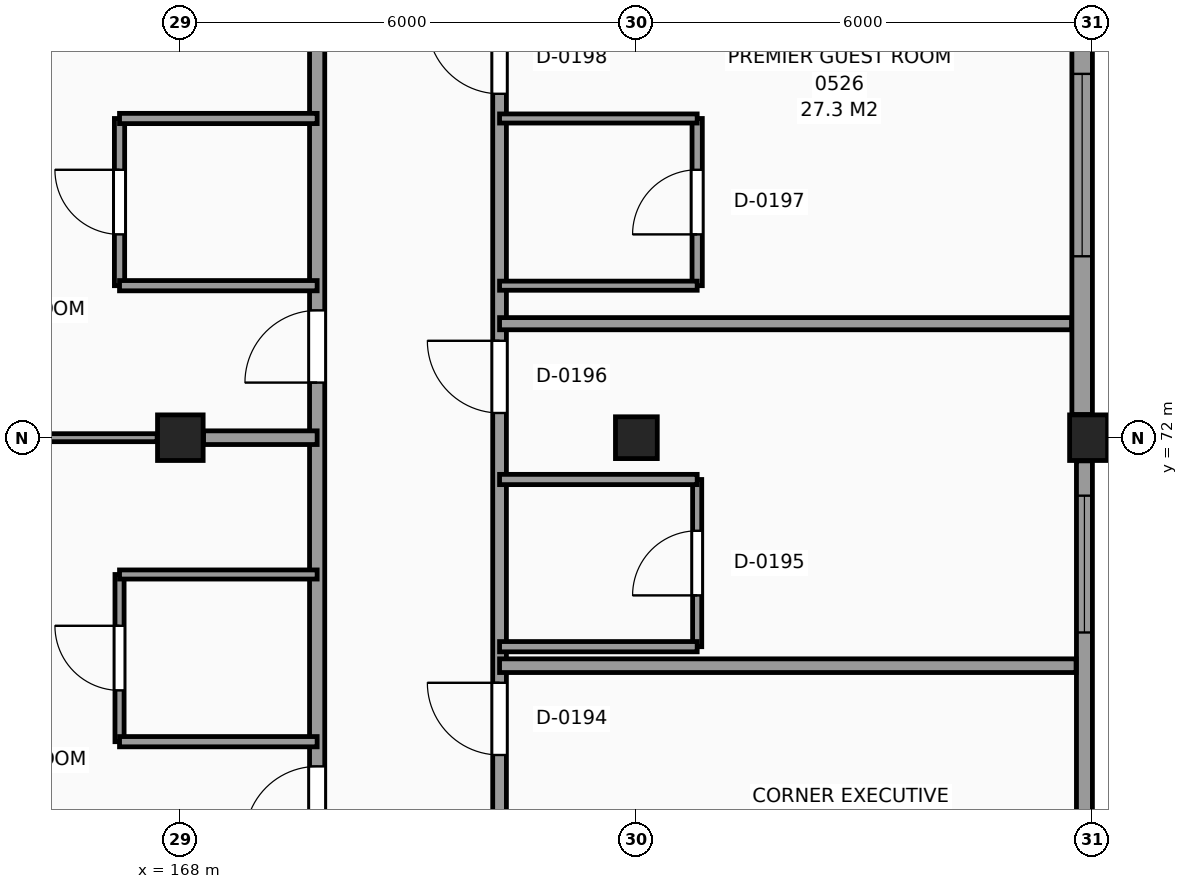
"""IFC4 building model, lengths in metres.
Left out: names, types, materials, properties, quantities, classifications, styles, units other than length and angle.
Written with IfcOpenShell. Run it as: python <this file> out.ifc"""

import sys

from ifc_helpers import new_model, si_unit, direction, frame, frame_2d, origin, origin_2d, place, context, subcontext, project, spatial, rectangle, extrude, element, fill, save


model = new_model("IFC4")
c1 = context("Model", 3, precision=1e-05, world=origin(), true_north=direction((0.0, 1.0)))
c2 = subcontext(c1, "Body", "Model", "MODEL_VIEW")
j1 = project(units=[si_unit("LENGTHUNIT", "METRE"), si_unit("PLANEANGLEUNIT", "RADIAN")], contexts=[c1])
p1 = place(None, origin())
s1 = spatial("IfcSite", under=j1, at=p1, CompositionType="ELEMENT")
p2 = place(p1, origin())
s2 = spatial("IfcBuilding", under=s1, at=p2, CompositionType="ELEMENT")
p3 = place(p2, frame((0.0, 0.0, 24.6)))
s3 = spatial("IfcBuildingStorey", under=s2, at=p3, CompositionType="ELEMENT", Elevation=24.6)
p4 = place(p3, frame((168.0, 72.0, 0.0), z_axis=(0.0, 0.0, 1.0), x_axis=(1.0, 0.0, 0.0)))
e1 = element("IfcColumn", 1, at=p4, inside=s3, PredefinedType="COLUMN", context=c2, shape_type="SweptSolid", body=[
    extrude(rectangle(XDim=0.6, YDim=0.6, at=origin_2d()), origin(), (0.0, 0.0, 1.0), 3.6),
])
p5 = place(p3, frame((174.0, 72.0, 0.0), z_axis=(0.0, 0.0, 1.0), x_axis=(1.0, 0.0, 0.0)))
e2 = element("IfcColumn", 2, at=p5, inside=s3, PredefinedType="COLUMN", context=c2, shape_type="SweptSolid", body=[
    extrude(rectangle(XDim=0.55, YDim=0.55, at=origin_2d()), origin(), (0.0, 0.0, 1.0), 3.6),
])
p6 = place(p3, frame((180.0, 72.0, 0.0), z_axis=(0.0, 0.0, 1.0), x_axis=(1.0, 0.0, 0.0)))
e3 = element("IfcColumn", 3, at=p6, inside=s3, PredefinedType="COLUMN", context=c2, shape_type="SweptSolid", body=[
    extrude(rectangle(XDim=0.6, YDim=0.6, at=origin_2d()), origin(), (0.0, 0.0, 1.0), 3.6),
])
p7 = place(p3, frame((179.895, 66.305, 0.0), z_axis=(0.0, 0.0, 1.0), x_axis=(0.0, 1.0, 0.0)))
e4 = element("IfcWall", 4, at=p7, inside=s3, PredefinedType="SOLIDWALL", context=c2, shape_type="SweptSolid", body=[
    extrude(rectangle(XDim=5.39, YDim=0.21, at=frame_2d((2.695, 0.0))), origin(), (0.0, 0.0, 1.0), 2.73),
])
p8 = place(p7, frame((3.132, 0.0, 0.8)))
e5 = element("IfcOpeningElement", 5, at=p8, cuts=e4, PredefinedType="OPENING", context=c2, shape_type="SweptSolid", body=[
    extrude(rectangle(XDim=1.8, YDim=1.7, at=frame_2d((0.9, 0.85))), frame((0.0, 0.115, 0.0), z_axis=(0.0, -1.0, 0.0), x_axis=(1.0, 0.0, 0.0)), (0.0, 0.0, 1.0), 0.23),
])
p9 = place(p3, frame((179.865, 72.305, 0.0), z_axis=(0.0, 0.0, 1.0), x_axis=(0.0, 1.0, 0.0)))
e6 = element("IfcWall", 6, at=p9, inside=s3, PredefinedType="SOLIDWALL", context=c2, shape_type="SweptSolid", body=[
    extrude(rectangle(XDim=5.39, YDim=0.27, at=frame_2d((2.695, 0.0))), origin(), (0.0, 0.0, 1.0), 2.73),
])
p10 = place(p9, frame((2.082, 0.0, 0.8)))
e7 = element("IfcOpeningElement", 7, at=p10, cuts=e6, PredefinedType="OPENING", context=c2, shape_type="SweptSolid", body=[
    extrude(rectangle(XDim=2.4, YDim=1.75, at=frame_2d((1.2, 0.875))), frame((0.0, 0.145, 0.0), z_axis=(0.0, -1.0, 0.0), x_axis=(1.0, 0.0, 0.0)), (0.0, 0.0, 1.0), 0.29),
])
p11 = place(p3, frame((167.2, 68.0, 0.0), z_axis=(0.0, 0.0, 1.0), x_axis=(0.0, 1.0, 0.0)))
e8 = element("IfcWall", 8, at=p11, inside=s3, PredefinedType="PARTITIONING", context=c2, shape_type="SweptSolid", body=[
    extrude(rectangle(XDim=2.2, YDim=0.12, at=frame_2d((1.1, 0.0))), origin(), (0.0, 0.0, 1.0), 3.38),
])
p12 = place(p11, frame((0.675, 0.0, 0.0)))
e9 = element("IfcOpeningElement", 9, at=p12, cuts=e8, PredefinedType="OPENING", context=c2, shape_type="SweptSolid", body=[
    extrude(rectangle(XDim=0.85, YDim=2.1, at=frame_2d((0.425, 1.05))), frame((0.0, 0.07, 0.0), z_axis=(0.0, -1.0, 0.0), x_axis=(1.0, 0.0, 0.0)), (0.0, 0.0, 1.0), 0.14),
])
p13 = place(p3, frame((167.2, 74.0, 0.0), z_axis=(0.0, 0.0, 1.0), x_axis=(0.0, 1.0, 0.0)))
e10 = element("IfcWall", 10, at=p13, inside=s3, PredefinedType="PARTITIONING", context=c2, shape_type="SweptSolid", body=[
    extrude(rectangle(XDim=2.2, YDim=0.135, at=frame_2d((1.1, 0.0))), origin(), (0.0, 0.0, 1.0), 3.38),
])
p14 = place(p13, frame((0.675, 0.0, 0.0)))
e11 = element("IfcOpeningElement", 11, at=p14, cuts=e10, PredefinedType="OPENING", context=c2, shape_type="SweptSolid", body=[
    extrude(rectangle(XDim=0.85, YDim=2.1, at=frame_2d((0.425, 1.05))), frame((0.0, 0.078, 0.0), z_axis=(0.0, -1.0, 0.0), x_axis=(1.0, 0.0, 0.0)), (0.0, 0.0, 1.0), 0.155),
])
p15 = place(p3, frame((169.8, 42.215, 0.0), z_axis=(0.0, 0.0, 1.0), x_axis=(0.0, 1.0, 0.0)))
e12 = element("IfcWall", 12, at=p15, inside=s3, PredefinedType="PARTITIONING", context=c2, shape_type="SweptSolid", body=[
    extrude(rectangle(XDim=65.605, YDim=0.2, at=frame_2d((32.802, 0.0))), origin(), (0.0, 0.0, 1.0), 3.38),
])
p16 = place(p15, frame((50.185, 0.0, 0.0)))
e13 = element("IfcOpeningElement", 13, at=p16, cuts=e12, PredefinedType="OPENING", context=c2, shape_type="SweptSolid", body=[
    extrude(rectangle(XDim=1.2, YDim=2.2, at=frame_2d((0.6, 1.1))), frame((0.0, 0.11, 0.0), z_axis=(0.0, -1.0, 0.0), x_axis=(1.0, 0.0, 0.0)), (0.0, 0.0, 1.0), 0.22),
])
p17 = place(p15, frame((0.46, 0.0, 0.0)))
e14 = element("IfcOpeningElement", 14, at=p17, cuts=e12, PredefinedType="OPENING", context=c2, shape_type="SweptSolid", body=[
    extrude(rectangle(XDim=0.95, YDim=2.1, at=frame_2d((0.475, 1.05))), frame((0.0, 0.11, 0.0), z_axis=(0.0, -1.0, 0.0), x_axis=(1.0, 0.0, 0.0)), (0.0, 0.0, 1.0), 0.22),
])
p18 = place(p15, frame((6.51, 0.0, 0.0)))
e15 = element("IfcOpeningElement", 15, at=p18, cuts=e12, PredefinedType="OPENING", context=c2, shape_type="SweptSolid", body=[
    extrude(rectangle(XDim=0.95, YDim=2.1, at=frame_2d((0.475, 1.05))), frame((0.0, 0.11, 0.0), z_axis=(0.0, -1.0, 0.0), x_axis=(1.0, 0.0, 0.0)), (0.0, 0.0, 1.0), 0.22),
])
p19 = place(p15, frame((12.51, 0.0, 0.0)))
e16 = element("IfcOpeningElement", 16, at=p19, cuts=e12, PredefinedType="OPENING", context=c2, shape_type="SweptSolid", body=[
    extrude(rectangle(XDim=0.95, YDim=2.1, at=frame_2d((0.475, 1.05))), frame((0.0, 0.11, 0.0), z_axis=(0.0, -1.0, 0.0), x_axis=(1.0, 0.0, 0.0)), (0.0, 0.0, 1.0), 0.22),
])
p20 = place(p15, frame((18.51, 0.0, 0.0)))
e17 = element("IfcOpeningElement", 17, at=p20, cuts=e12, PredefinedType="OPENING", context=c2, shape_type="SweptSolid", body=[
    extrude(rectangle(XDim=0.95, YDim=2.1, at=frame_2d((0.475, 1.05))), frame((0.0, 0.11, 0.0), z_axis=(0.0, -1.0, 0.0), x_axis=(1.0, 0.0, 0.0)), (0.0, 0.0, 1.0), 0.22),
])
p21 = place(p15, frame((24.51, 0.0, 0.0)))
e18 = element("IfcOpeningElement", 18, at=p21, cuts=e12, PredefinedType="OPENING", context=c2, shape_type="SweptSolid", body=[
    extrude(rectangle(XDim=0.95, YDim=2.1, at=frame_2d((0.475, 1.05))), frame((0.0, 0.11, 0.0), z_axis=(0.0, -1.0, 0.0), x_axis=(1.0, 0.0, 0.0)), (0.0, 0.0, 1.0), 0.22),
])
p22 = place(p15, frame((30.51, 0.0, 0.0)))
e19 = element("IfcOpeningElement", 19, at=p22, cuts=e12, PredefinedType="OPENING", context=c2, shape_type="SweptSolid", body=[
    extrude(rectangle(XDim=0.95, YDim=2.1, at=frame_2d((0.475, 1.05))), frame((0.0, 0.11, 0.0), z_axis=(0.0, -1.0, 0.0), x_axis=(1.0, 0.0, 0.0)), (0.0, 0.0, 1.0), 0.22),
])
p23 = place(p15, frame((54.51, 0.0, 0.0)))
e20 = element("IfcOpeningElement", 20, at=p23, cuts=e12, PredefinedType="OPENING", context=c2, shape_type="SweptSolid", body=[
    extrude(rectangle(XDim=0.95, YDim=2.1, at=frame_2d((0.475, 1.05))), frame((0.0, 0.11, 0.0), z_axis=(0.0, -1.0, 0.0), x_axis=(1.0, 0.0, 0.0)), (0.0, 0.0, 1.0), 0.22),
])
p24 = place(p15, frame((60.51, 0.0, 0.0)))
e21 = element("IfcOpeningElement", 21, at=p24, cuts=e12, PredefinedType="OPENING", context=c2, shape_type="SweptSolid", body=[
    extrude(rectangle(XDim=0.95, YDim=2.1, at=frame_2d((0.475, 1.05))), frame((0.0, 0.11, 0.0), z_axis=(0.0, -1.0, 0.0), x_axis=(1.0, 0.0, 0.0)), (0.0, 0.0, 1.0), 0.22),
])
p25 = place(p3, frame((172.2, 42.215, 0.0), z_axis=(0.0, 0.0, 1.0), x_axis=(0.0, 1.0, 0.0)))
e22 = element("IfcWall", 22, at=p25, inside=s3, PredefinedType="PARTITIONING", context=c2, shape_type="SweptSolid", body=[
    extrude(rectangle(XDim=65.605, YDim=0.18, at=frame_2d((32.802, 0.0))), origin(), (0.0, 0.0, 1.0), 3.38),
])
p26 = place(p25, frame((7.61, 0.0, 0.0)))
e23 = element("IfcOpeningElement", 23, at=p26, cuts=e22, PredefinedType="OPENING", context=c2, shape_type="SweptSolid", body=[
    extrude(rectangle(XDim=0.95, YDim=2.1, at=frame_2d((0.475, 1.05))), frame((0.0, 0.1, 0.0), z_axis=(0.0, -1.0, 0.0), x_axis=(1.0, 0.0, 0.0)), (0.0, 0.0, 1.0), 0.2),
])
p27 = place(p25, frame((12.11, 0.0, 0.0)))
e24 = element("IfcOpeningElement", 24, at=p27, cuts=e22, PredefinedType="OPENING", context=c2, shape_type="SweptSolid", body=[
    extrude(rectangle(XDim=0.95, YDim=2.1, at=frame_2d((0.475, 1.05))), frame((0.0, 0.1, 0.0), z_axis=(0.0, -1.0, 0.0), x_axis=(1.0, 0.0, 0.0)), (0.0, 0.0, 1.0), 0.2),
])
p28 = place(p25, frame((16.31, 0.0, 0.0)))
e25 = element("IfcOpeningElement", 25, at=p28, cuts=e22, PredefinedType="OPENING", context=c2, shape_type="SweptSolid", body=[
    extrude(rectangle(XDim=0.95, YDim=2.1, at=frame_2d((0.475, 1.05))), frame((0.0, 0.1, 0.0), z_axis=(0.0, -1.0, 0.0), x_axis=(1.0, 0.0, 0.0)), (0.0, 0.0, 1.0), 0.2),
])
p29 = place(p25, frame((25.61, 0.0, 0.0)))
e26 = element("IfcOpeningElement", 26, at=p29, cuts=e22, PredefinedType="OPENING", context=c2, shape_type="SweptSolid", body=[
    extrude(rectangle(XDim=0.95, YDim=2.1, at=frame_2d((0.475, 1.05))), frame((0.0, 0.1, 0.0), z_axis=(0.0, -1.0, 0.0), x_axis=(1.0, 0.0, 0.0)), (0.0, 0.0, 1.0), 0.2),
])
p30 = place(p25, frame((30.11, 0.0, 0.0)))
e27 = element("IfcOpeningElement", 27, at=p30, cuts=e22, PredefinedType="OPENING", context=c2, shape_type="SweptSolid", body=[
    extrude(rectangle(XDim=0.95, YDim=2.1, at=frame_2d((0.475, 1.05))), frame((0.0, 0.1, 0.0), z_axis=(0.0, -1.0, 0.0), x_axis=(1.0, 0.0, 0.0)), (0.0, 0.0, 1.0), 0.2),
])
p31 = place(p25, frame((34.31, 0.0, 0.0)))
e28 = element("IfcOpeningElement", 28, at=p31, cuts=e22, PredefinedType="OPENING", context=c2, shape_type="SweptSolid", body=[
    extrude(rectangle(XDim=0.95, YDim=2.1, at=frame_2d((0.475, 1.05))), frame((0.0, 0.1, 0.0), z_axis=(0.0, -1.0, 0.0), x_axis=(1.0, 0.0, 0.0)), (0.0, 0.0, 1.0), 0.2),
])
p32 = place(p25, frame((36.51, 0.0, 0.0)))
e29 = element("IfcOpeningElement", 29, at=p32, cuts=e22, PredefinedType="OPENING", context=c2, shape_type="SweptSolid", body=[
    extrude(rectangle(XDim=0.95, YDim=2.1, at=frame_2d((0.475, 1.05))), frame((0.0, 0.1, 0.0), z_axis=(0.0, -1.0, 0.0), x_axis=(1.0, 0.0, 0.0)), (0.0, 0.0, 1.0), 0.2),
])
p33 = place(p25, frame((42.51, 0.0, 0.0)))
e30 = element("IfcOpeningElement", 30, at=p33, cuts=e22, PredefinedType="OPENING", context=c2, shape_type="SweptSolid", body=[
    extrude(rectangle(XDim=0.95, YDim=2.1, at=frame_2d((0.475, 1.05))), frame((0.0, 0.1, 0.0), z_axis=(0.0, -1.0, 0.0), x_axis=(1.0, 0.0, 0.0)), (0.0, 0.0, 1.0), 0.2),
])
p34 = place(p25, frame((52.31, 0.0, 0.0)))
e31 = element("IfcOpeningElement", 31, at=p34, cuts=e22, PredefinedType="OPENING", context=c2, shape_type="SweptSolid", body=[
    extrude(rectangle(XDim=0.95, YDim=2.1, at=frame_2d((0.475, 1.05))), frame((0.0, 0.1, 0.0), z_axis=(0.0, -1.0, 0.0), x_axis=(1.0, 0.0, 0.0)), (0.0, 0.0, 1.0), 0.2),
])
p35 = place(p25, frame((54.51, 0.0, 0.0)))
e32 = element("IfcOpeningElement", 32, at=p35, cuts=e22, PredefinedType="OPENING", context=c2, shape_type="SweptSolid", body=[
    extrude(rectangle(XDim=0.95, YDim=2.1, at=frame_2d((0.475, 1.05))), frame((0.0, 0.1, 0.0), z_axis=(0.0, -1.0, 0.0), x_axis=(1.0, 0.0, 0.0)), (0.0, 0.0, 1.0), 0.2),
])
p36 = place(p25, frame((60.51, 0.0, 0.0)))
e33 = element("IfcOpeningElement", 33, at=p36, cuts=e22, PredefinedType="OPENING", context=c2, shape_type="SweptSolid", body=[
    extrude(rectangle(XDim=0.95, YDim=2.1, at=frame_2d((0.475, 1.05))), frame((0.0, 0.1, 0.0), z_axis=(0.0, -1.0, 0.0), x_axis=(1.0, 0.0, 0.0)), (0.0, 0.0, 1.0), 0.2),
])
p37 = place(p3, frame((174.8, 69.25, 0.0), z_axis=(0.0, 0.0, 1.0), x_axis=(0.0, 1.0, 0.0)))
e34 = element("IfcWall", 34, at=p37, inside=s3, PredefinedType="PARTITIONING", context=c2, shape_type="SweptSolid", body=[
    extrude(rectangle(XDim=2.2, YDim=0.12, at=frame_2d((1.1, 0.0))), origin(), (0.0, 0.0, 1.0), 3.38),
])
p38 = place(p37, frame((0.675, 0.0, 0.0)))
e35 = element("IfcOpeningElement", 35, at=p38, cuts=e34, PredefinedType="OPENING", context=c2, shape_type="SweptSolid", body=[
    extrude(rectangle(XDim=0.85, YDim=2.1, at=frame_2d((0.425, 1.05))), frame((0.0, 0.07, 0.0), z_axis=(0.0, -1.0, 0.0), x_axis=(1.0, 0.0, 0.0)), (0.0, 0.0, 1.0), 0.14),
])
p39 = place(p3, frame((174.8, 74.0, 0.0), z_axis=(0.0, 0.0, 1.0), x_axis=(0.0, 1.0, 0.0)))
e36 = element("IfcWall", 36, at=p39, inside=s3, PredefinedType="PARTITIONING", context=c2, shape_type="SweptSolid", body=[
    extrude(rectangle(XDim=2.2, YDim=0.135, at=frame_2d((1.1, 0.0))), origin(), (0.0, 0.0, 1.0), 3.38),
])
p40 = place(p39, frame((0.675, 0.0, 0.0)))
e37 = element("IfcOpeningElement", 37, at=p40, cuts=e36, PredefinedType="OPENING", context=c2, shape_type="SweptSolid", body=[
    extrude(rectangle(XDim=0.85, YDim=2.1, at=frame_2d((0.425, 1.05))), frame((0.0, 0.078, 0.0), z_axis=(0.0, -1.0, 0.0), x_axis=(1.0, 0.0, 0.0)), (0.0, 0.0, 1.0), 0.155),
])
p41 = place(p3, frame((167.2, 68.0, 0.0), z_axis=(0.0, 0.0, 1.0), x_axis=(1.0, 0.0, 0.0)))
e38 = element("IfcWall", 38, at=p41, inside=s3, PredefinedType="PARTITIONING", context=c2, shape_type="SweptSolid", body=[
    extrude(rectangle(XDim=2.6, YDim=0.135, at=frame_2d((1.3, 0.0))), origin(), (0.0, 0.0, 1.0), 3.38),
])
p42 = place(p3, frame((172.2, 69.0, 0.0), z_axis=(0.0, 0.0, 1.0), x_axis=(1.0, 0.0, 0.0)))
e39 = element("IfcWall", 39, at=p42, inside=s3, PredefinedType="PARTITIONING", context=c2, shape_type="SweptSolid", body=[
    extrude(rectangle(XDim=7.585, YDim=0.18, at=frame_2d((3.792, 0.0))), origin(), (0.0, 0.0, 1.0), 3.38),
])
p43 = place(p3, frame((172.2, 69.25, 0.0), z_axis=(0.0, 0.0, 1.0), x_axis=(1.0, 0.0, 0.0)))
e40 = element("IfcWall", 40, at=p43, inside=s3, PredefinedType="PARTITIONING", context=c2, shape_type="SweptSolid", body=[
    extrude(rectangle(XDim=2.6, YDim=0.135, at=frame_2d((1.3, 0.0))), origin(), (0.0, 0.0, 1.0), 3.38),
])
p44 = place(p3, frame((167.2, 70.2, 0.0), z_axis=(0.0, 0.0, 1.0), x_axis=(1.0, 0.0, 0.0)))
e41 = element("IfcWall", 41, at=p44, inside=s3, PredefinedType="PARTITIONING", context=c2, shape_type="SweptSolid", body=[
    extrude(rectangle(XDim=2.6, YDim=0.12, at=frame_2d((1.3, 0.0))), origin(), (0.0, 0.0, 1.0), 3.38),
])
p45 = place(p3, frame((172.2, 71.45, 0.0), z_axis=(0.0, 0.0, 1.0), x_axis=(1.0, 0.0, 0.0)))
e42 = element("IfcWall", 42, at=p45, inside=s3, PredefinedType="PARTITIONING", context=c2, shape_type="SweptSolid", body=[
    extrude(rectangle(XDim=2.6, YDim=0.135, at=frame_2d((1.3, 0.0))), origin(), (0.0, 0.0, 1.0), 3.38),
])
p46 = place(p3, frame((162.28, 72.0, 0.0), z_axis=(0.0, 0.0, 1.0), x_axis=(1.0, 0.0, 0.0)))
e43 = element("IfcWall", 43, at=p46, inside=s3, PredefinedType="PARTITIONING", context=c2, shape_type="SweptSolid", body=[
    extrude(rectangle(XDim=5.415, YDim=0.105, at=frame_2d((2.708, 0.0))), origin(), (0.0, 0.0, 1.0), 2.58),
])
p47 = place(p3, frame((168.305, 72.0, 0.0), z_axis=(0.0, 0.0, 1.0), x_axis=(1.0, 0.0, 0.0)))
e44 = element("IfcWall", 44, at=p47, inside=s3, PredefinedType="PARTITIONING", context=c2, shape_type="SweptSolid", body=[
    extrude(rectangle(XDim=1.495, YDim=0.18, at=frame_2d((0.748, 0.0))), origin(), (0.0, 0.0, 1.0), 2.58),
])
p48 = place(p3, frame((172.2, 73.5, 0.0), z_axis=(0.0, 0.0, 1.0), x_axis=(1.0, 0.0, 0.0)))
e45 = element("IfcWall", 45, at=p48, inside=s3, PredefinedType="PARTITIONING", context=c2, shape_type="SweptSolid", body=[
    extrude(rectangle(XDim=7.525, YDim=0.16, at=frame_2d((3.763, 0.0))), origin(), (0.0, 0.0, 1.0), 3.38),
])
p49 = place(p3, frame((167.2, 74.0, 0.0), z_axis=(0.0, 0.0, 1.0), x_axis=(1.0, 0.0, 0.0)))
e46 = element("IfcWall", 46, at=p49, inside=s3, PredefinedType="PARTITIONING", context=c2, shape_type="SweptSolid", body=[
    extrude(rectangle(XDim=2.6, YDim=0.135, at=frame_2d((1.3, 0.0))), origin(), (0.0, 0.0, 1.0), 3.38),
])
p50 = place(p3, frame((172.2, 74.0, 0.0), z_axis=(0.0, 0.0, 1.0), x_axis=(1.0, 0.0, 0.0)))
e47 = element("IfcWall", 47, at=p50, inside=s3, PredefinedType="PARTITIONING", context=c2, shape_type="SweptSolid", body=[
    extrude(rectangle(XDim=2.6, YDim=0.12, at=frame_2d((1.3, 0.0))), origin(), (0.0, 0.0, 1.0), 3.38),
])
p51 = place(p3, frame((167.2, 76.2, 0.0), z_axis=(0.0, 0.0, 1.0), x_axis=(1.0, 0.0, 0.0)))
e48 = element("IfcWall", 48, at=p51, inside=s3, PredefinedType="PARTITIONING", context=c2, shape_type="SweptSolid", body=[
    extrude(rectangle(XDim=2.6, YDim=0.135, at=frame_2d((1.3, 0.0))), origin(), (0.0, 0.0, 1.0), 3.38),
])
p52 = place(p3, frame((172.2, 76.2, 0.0), z_axis=(0.0, 0.0, 1.0), x_axis=(1.0, 0.0, 0.0)))
e49 = element("IfcWall", 49, at=p52, inside=s3, PredefinedType="PARTITIONING", context=c2, shape_type="SweptSolid", body=[
    extrude(rectangle(XDim=2.6, YDim=0.12, at=frame_2d((1.3, 0.0))), origin(), (0.0, 0.0, 1.0), 3.38),
])
p53 = place(p8, origin())
e50 = element("IfcWindow", 50, at=p53, inside=s3, PartitioningType="SINGLE_PANEL", PredefinedType="WINDOW", context=c2, shape_type="SweptSolid", body=[
    extrude(rectangle(XDim=1.8, YDim=1.7, at=frame_2d((0.9, 0.85))), frame((0.0, 0.03, 0.0), z_axis=(0.0, -1.0, 0.0), x_axis=(1.0, 0.0, 0.0)), (0.0, 0.0, 1.0), 0.06),
])
fill(e5, e50)
p54 = place(p10, origin())
e51 = element("IfcWindow", 51, at=p54, inside=s3, PartitioningType="SINGLE_PANEL", PredefinedType="WINDOW", context=c2, shape_type="SweptSolid", body=[
    extrude(rectangle(XDim=2.4, YDim=1.75, at=frame_2d((1.2, 0.875))), frame((0.0, 0.03, 0.0), z_axis=(0.0, -1.0, 0.0), x_axis=(1.0, 0.0, 0.0)), (0.0, 0.0, 1.0), 0.06),
])
fill(e7, e51)
p55 = place(p29, origin())
e52 = element("IfcDoor", 52, at=p55, inside=s3, OperationType="SINGLE_SWING_RIGHT", PredefinedType="DOOR", context=c2, shape_type="SweptSolid", body=[
    extrude(rectangle(XDim=0.95, YDim=2.1, at=frame_2d((0.475, 1.05))), frame((0.0, 0.025, 0.0), z_axis=(0.0, -1.0, 0.0), x_axis=(1.0, 0.0, 0.0)), (0.0, 0.0, 1.0), 0.05),
])
fill(e26, e52)
p56 = place(p38, origin())
e53 = element("IfcDoor", 53, at=p56, inside=s3, OperationType="SINGLE_SWING_LEFT", PredefinedType="DOOR", context=c2, shape_type="SweptSolid", body=[
    extrude(rectangle(XDim=0.85, YDim=2.1, at=frame_2d((0.425, 1.05))), frame((0.0, 0.025, 0.0), z_axis=(0.0, -1.0, 0.0), x_axis=(1.0, 0.0, 0.0)), (0.0, 0.0, 1.0), 0.05),
])
fill(e35, e53)
p57 = place(p30, origin())
e54 = element("IfcDoor", 54, at=p57, inside=s3, OperationType="SINGLE_SWING_RIGHT", PredefinedType="DOOR", context=c2, shape_type="SweptSolid", body=[
    extrude(rectangle(XDim=0.95, YDim=2.1, at=frame_2d((0.475, 1.05))), frame((0.0, 0.025, 0.0), z_axis=(0.0, -1.0, 0.0), x_axis=(1.0, 0.0, 0.0)), (0.0, 0.0, 1.0), 0.05),
])
fill(e27, e54)
p58 = place(p40, origin())
e55 = element("IfcDoor", 55, at=p58, inside=s3, OperationType="SINGLE_SWING_LEFT", PredefinedType="DOOR", context=c2, shape_type="SweptSolid", body=[
    extrude(rectangle(XDim=0.85, YDim=2.1, at=frame_2d((0.425, 1.05))), frame((0.0, 0.025, 0.0), z_axis=(0.0, -1.0, 0.0), x_axis=(1.0, 0.0, 0.0)), (0.0, 0.0, 1.0), 0.05),
])
fill(e37, e55)
p59 = place(p31, origin())
e56 = element("IfcDoor", 56, at=p59, inside=s3, OperationType="SINGLE_SWING_RIGHT", PredefinedType="DOOR", context=c2, shape_type="SweptSolid", body=[
    extrude(rectangle(XDim=0.95, YDim=2.1, at=frame_2d((0.475, 1.05))), frame((0.0, 0.025, 0.0), z_axis=(0.0, -1.0, 0.0), x_axis=(1.0, 0.0, 0.0)), (0.0, 0.0, 1.0), 0.05),
])
fill(e28, e56)
p60 = place(p12, origin())
e57 = element("IfcDoor", 57, at=p60, inside=s3, OperationType="SINGLE_SWING_RIGHT", PredefinedType="DOOR", context=c2, shape_type="SweptSolid", body=[
    extrude(rectangle(XDim=0.85, YDim=2.1, at=frame_2d((0.425, 1.05))), frame((0.0, 0.025, 0.0), z_axis=(0.0, -1.0, 0.0), x_axis=(1.0, 0.0, 0.0)), (0.0, 0.0, 1.0), 0.05),
])
fill(e9, e57)
p61 = place(p21, origin())
e58 = element("IfcDoor", 58, at=p61, inside=s3, OperationType="SINGLE_SWING_LEFT", PredefinedType="DOOR", context=c2, shape_type="SweptSolid", body=[
    extrude(rectangle(XDim=0.95, YDim=2.1, at=frame_2d((0.475, 1.05))), frame((0.0, 0.025, 0.0), z_axis=(0.0, -1.0, 0.0), x_axis=(1.0, 0.0, 0.0)), (0.0, 0.0, 1.0), 0.05),
])
fill(e18, e58)
p62 = place(p14, origin())
e59 = element("IfcDoor", 59, at=p62, inside=s3, OperationType="SINGLE_SWING_RIGHT", PredefinedType="DOOR", context=c2, shape_type="SweptSolid", body=[
    extrude(rectangle(XDim=0.85, YDim=2.1, at=frame_2d((0.425, 1.05))), frame((0.0, 0.025, 0.0), z_axis=(0.0, -1.0, 0.0), x_axis=(1.0, 0.0, 0.0)), (0.0, 0.0, 1.0), 0.05),
])
fill(e11, e59)
p63 = place(p22, origin())
e60 = element("IfcDoor", 60, at=p63, inside=s3, OperationType="SINGLE_SWING_LEFT", PredefinedType="DOOR", context=c2, shape_type="SweptSolid", body=[
    extrude(rectangle(XDim=0.95, YDim=2.1, at=frame_2d((0.475, 1.05))), frame((0.0, 0.025, 0.0), z_axis=(0.0, -1.0, 0.0), x_axis=(1.0, 0.0, 0.0)), (0.0, 0.0, 1.0), 0.05),
])
fill(e19, e60)
save(model, sys.argv[1])
